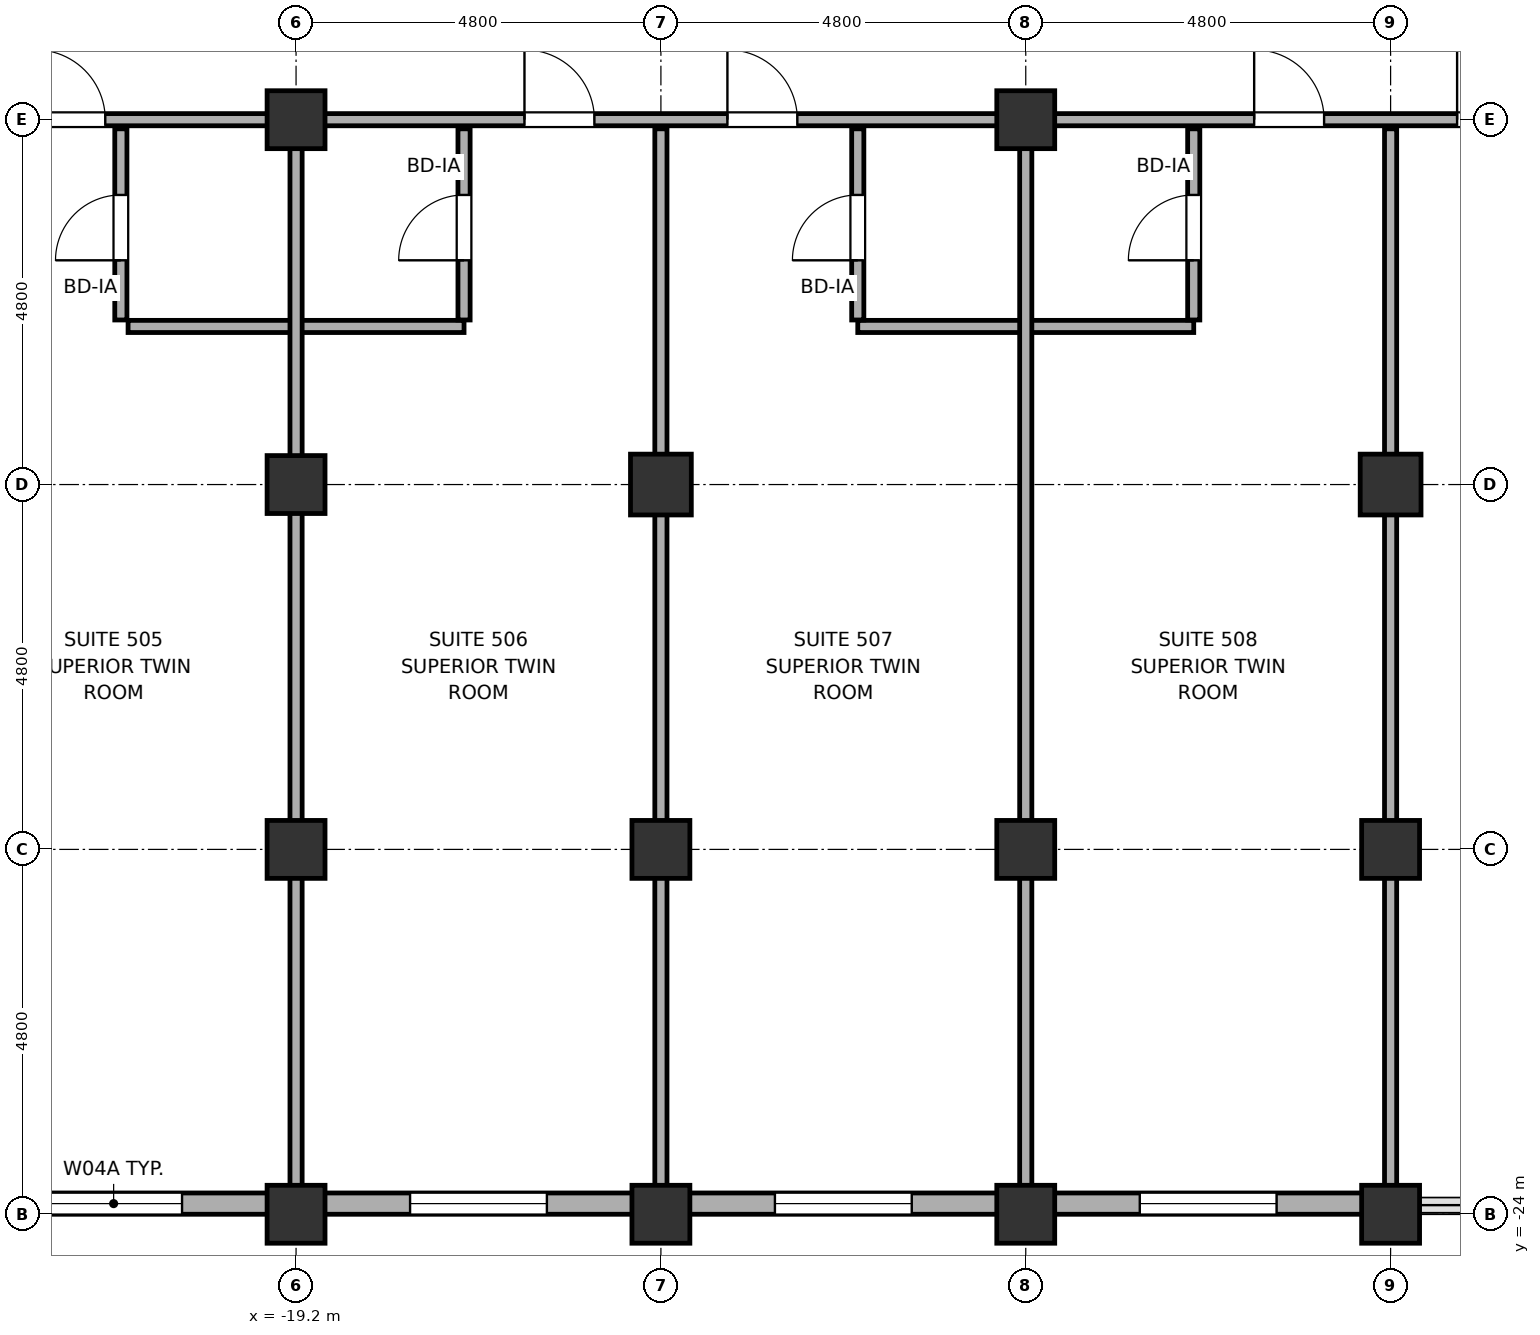
"""IFC4 building model, lengths in metres.
Left out: names, types, materials, properties, quantities, classifications, styles, units other than length and angle.
Written with IfcOpenShell. Run it as: python <this file> out.ifc"""

import sys

from ifc_helpers import new_model, si_unit, direction, frame, frame_2d, origin, origin_2d, place, context, subcontext, project, spatial, rectangle, hollow_rectangle, hollow_circle, extrude, element, fill, save


model = new_model("IFC4")
c1 = context("Model", 3, precision=1e-05, world=origin(), true_north=direction((0.0, 1.0)))
c2 = subcontext(c1, "Body", "Model", "MODEL_VIEW")
j1 = project(units=[si_unit("LENGTHUNIT", "METRE"), si_unit("PLANEANGLEUNIT", "RADIAN")], contexts=[c1])
p1 = place(None, origin())
s1 = spatial("IfcSite", under=j1, at=p1, CompositionType="ELEMENT")
p2 = place(p1, origin())
s2 = spatial("IfcBuilding", under=s1, at=p2, CompositionType="ELEMENT")
p3 = place(p2, frame((0.0, 0.0, 30.0)))
s3 = spatial("IfcBuildingStorey", under=s2, at=p3, CompositionType="ELEMENT", Elevation=30.0)
for number, where, z_axis, x_axis in (
    (1, (-19.2, -24.0, 0.0), (0.0, 0.0, 1.0), (1.0, 0.0, 0.0)),
    (2, (-19.2, -19.2, 0.0), (0.0, 0.0, 1.0), (1.0, 0.0, 0.0)),
    (3, (-19.2, -14.4, 0.0), (0.0, 0.0, 1.0), (1.0, 0.0, 0.0)),
    (4, (-19.2, -9.6, 0.0), (0.0, 0.0, 1.0), (1.0, 0.0, 0.0)),
    (5, (-14.4, -24.0, 0.0), (0.0, 0.0, 1.0), (1.0, 0.0, 0.0)),
    (6, (-14.4, -19.2, 0.0), (0.0, 0.0, 1.0), (1.0, 0.0, 0.0)),
):
    element("IfcColumn", number, at=place(p3, frame(where, z_axis=z_axis, x_axis=x_axis)), inside=s3, PredefinedType="COLUMN", context=c2, shape_type="SweptSolid", body=[
        extrude(hollow_circle(Radius=0.381, WallThickness=0.032, at=origin_2d()), origin(), (0.0, 0.0, 1.0), 3.7),
    ])
p4 = place(p3, frame((-14.4, -14.4, 0.0), z_axis=(0.0, 0.0, 1.0), x_axis=(1.0, 0.0, 0.0)))
e7 = element("IfcColumn", 7, at=p4, inside=s3, PredefinedType="COLUMN", context=c2, shape_type="SweptSolid", body=[
    extrude(hollow_rectangle(XDim=0.8, YDim=0.8, WallThickness=0.036, at=origin_2d()), origin(), (0.0, 0.0, 1.0), 3.7),
])
for number, where, z_axis, x_axis in (
    (8, (-9.6, -24.0, 0.0), (0.0, 0.0, 1.0), (1.0, 0.0, 0.0)),
    (9, (-9.6, -19.2, 0.0), (0.0, 0.0, 1.0), (1.0, 0.0, 0.0)),
    (10, (-9.6, -9.6, 0.0), (0.0, 0.0, 1.0), (1.0, 0.0, 0.0)),
    (11, (-4.8, -24.0, 0.0), (0.0, 0.0, 1.0), (1.0, 0.0, 0.0)),
    (12, (-4.8, -19.2, 0.0), (0.0, 0.0, 1.0), (1.0, 0.0, 0.0)),
):
    element("IfcColumn", number, at=place(p3, frame(where, z_axis=z_axis, x_axis=x_axis)), inside=s3, PredefinedType="COLUMN", context=c2, shape_type="SweptSolid", body=[
        extrude(hollow_circle(Radius=0.381, WallThickness=0.032, at=origin_2d()), origin(), (0.0, 0.0, 1.0), 3.7),
    ])
p5 = place(p3, frame((-4.8, -14.4, 0.0), z_axis=(0.0, 0.0, 1.0), x_axis=(1.0, 0.0, 0.0)))
e13 = element("IfcColumn", 13, at=p5, inside=s3, PredefinedType="COLUMN", context=c2, shape_type="SweptSolid", body=[
    extrude(hollow_rectangle(XDim=0.8, YDim=0.8, WallThickness=0.036, at=origin_2d()), origin(), (0.0, 0.0, 1.0), 3.7),
])
p6 = place(p3, frame((-30.0, -23.86, 0.0), z_axis=(0.0, 0.0, 1.0), x_axis=(1.0, 0.0, 0.0)))
e14 = element("IfcWall", 14, at=p6, inside=s3, PredefinedType="SOLIDWALL", context=c2, shape_type="SweptSolid", body=[
    extrude(rectangle(XDim=25.25, YDim=0.28, at=frame_2d((12.625, 0.0))), origin(), (0.0, 0.0, 1.0), 2.12),
])
p7 = place(p6, frame((7.5, 0.0, 0.75)))
e15 = element("IfcOpeningElement", 15, at=p7, cuts=e14, PredefinedType="OPENING", context=c2, shape_type="SweptSolid", body=[
    extrude(rectangle(XDim=1.8, YDim=1.15, at=frame_2d((0.9, 0.575))), frame((0.0, 0.155, 0.0), z_axis=(0.0, -1.0, 0.0), x_axis=(1.0, 0.0, 0.0)), (0.0, 0.0, 1.0), 0.31),
])
p8 = place(p6, frame((12.3, 0.0, 0.75)))
e16 = element("IfcOpeningElement", 16, at=p8, cuts=e14, PredefinedType="OPENING", context=c2, shape_type="SweptSolid", body=[
    extrude(rectangle(XDim=1.8, YDim=1.15, at=frame_2d((0.9, 0.575))), frame((0.0, 0.155, 0.0), z_axis=(0.0, -1.0, 0.0), x_axis=(1.0, 0.0, 0.0)), (0.0, 0.0, 1.0), 0.31),
])
p9 = place(p6, frame((17.1, 0.0, 0.75)))
e17 = element("IfcOpeningElement", 17, at=p9, cuts=e14, PredefinedType="OPENING", context=c2, shape_type="SweptSolid", body=[
    extrude(rectangle(XDim=1.8, YDim=1.15, at=frame_2d((0.9, 0.575))), frame((0.0, 0.155, 0.0), z_axis=(0.0, -1.0, 0.0), x_axis=(1.0, 0.0, 0.0)), (0.0, 0.0, 1.0), 0.31),
])
p10 = place(p6, frame((21.9, 0.0, 0.75)))
e18 = element("IfcOpeningElement", 18, at=p10, cuts=e14, PredefinedType="OPENING", context=c2, shape_type="SweptSolid", body=[
    extrude(rectangle(XDim=1.8, YDim=1.15, at=frame_2d((0.9, 0.575))), frame((0.0, 0.155, 0.0), z_axis=(0.0, -1.0, 0.0), x_axis=(1.0, 0.0, 0.0)), (0.0, 0.0, 1.0), 0.31),
])
p11 = place(p3, frame((-21.41, -12.32, 0.0), z_axis=(0.0, 0.0, 1.0), x_axis=(1.0, 0.0, 0.0)))
e19 = element("IfcWall", 19, at=p11, inside=s3, PredefinedType="PARTITIONING", context=c2, shape_type="SweptSolid", body=[
    extrude(rectangle(XDim=4.42, YDim=0.16, at=frame_2d((2.21, 0.0))), origin(), (0.0, 0.0, 1.0), 2.82),
])
p12 = place(p3, frame((-11.81, -12.32, 0.0), z_axis=(0.0, 0.0, 1.0), x_axis=(1.0, 0.0, 0.0)))
e20 = element("IfcWall", 20, at=p12, inside=s3, PredefinedType="PARTITIONING", context=c2, shape_type="SweptSolid", body=[
    extrude(rectangle(XDim=4.42, YDim=0.16, at=frame_2d((2.21, 0.0))), origin(), (0.0, 0.0, 1.0), 3.02),
])
p13 = place(p3, frame((-33.31, -9.6, 0.0), z_axis=(0.0, 0.0, 1.0), x_axis=(1.0, 0.0, 0.0)))
e21 = element("IfcWall", 21, at=p13, inside=s3, PredefinedType="PARTITIONING", context=c2, shape_type="SweptSolid", body=[
    extrude(rectangle(XDim=61.82, YDim=0.16, at=frame_2d((30.91, 0.0))), origin(), (0.0, 0.0, 1.0), 2.12),
])
p14 = place(p13, frame((6.679, 0.0, 0.0)))
e22 = element("IfcOpeningElement", 22, at=p14, cuts=e21, PredefinedType="OPENING", context=c2, shape_type="SweptSolid", body=[
    extrude(rectangle(XDim=0.9, YDim=2.02, at=frame_2d((0.45, 1.01))), frame((0.0, 0.095, 0.0), z_axis=(0.0, -1.0, 0.0), x_axis=(1.0, 0.0, 0.0)), (0.0, 0.0, 1.0), 0.19),
])
p15 = place(p13, frame((54.24, 0.0, 0.0)))
e23 = element("IfcOpeningElement", 23, at=p15, cuts=e21, PredefinedType="OPENING", context=c2, shape_type="SweptSolid", body=[
    extrude(rectangle(XDim=0.9, YDim=2.02, at=frame_2d((0.45, 1.01))), frame((0.0, 0.095, 0.0), z_axis=(0.0, -1.0, 0.0), x_axis=(1.0, 0.0, 0.0)), (0.0, 0.0, 1.0), 0.19),
])
p16 = place(p13, frame((10.68, 0.0, 0.0)))
e24 = element("IfcOpeningElement", 24, at=p16, cuts=e21, PredefinedType="OPENING", context=c2, shape_type="SweptSolid", body=[
    extrude(rectangle(XDim=0.92, YDim=2.02, at=frame_2d((0.46, 1.01))), frame((0.0, 0.095, 0.0), z_axis=(0.0, -1.0, 0.0), x_axis=(1.0, 0.0, 0.0)), (0.0, 0.0, 1.0), 0.19),
])
p17 = place(p13, frame((17.115, 0.0, 0.0)))
e25 = element("IfcOpeningElement", 25, at=p17, cuts=e21, PredefinedType="OPENING", context=c2, shape_type="SweptSolid", body=[
    extrude(rectangle(XDim=0.92, YDim=2.02, at=frame_2d((0.46, 1.01))), frame((0.0, 0.095, 0.0), z_axis=(0.0, -1.0, 0.0), x_axis=(1.0, 0.0, 0.0)), (0.0, 0.0, 1.0), 0.19),
])
p18 = place(p13, frame((19.785, 0.0, 0.0)))
e26 = element("IfcOpeningElement", 26, at=p18, cuts=e21, PredefinedType="OPENING", context=c2, shape_type="SweptSolid", body=[
    extrude(rectangle(XDim=0.92, YDim=2.02, at=frame_2d((0.46, 1.01))), frame((0.0, 0.095, 0.0), z_axis=(0.0, -1.0, 0.0), x_axis=(1.0, 0.0, 0.0)), (0.0, 0.0, 1.0), 0.19),
])
p19 = place(p13, frame((26.715, 0.0, 0.0)))
e27 = element("IfcOpeningElement", 27, at=p19, cuts=e21, PredefinedType="OPENING", context=c2, shape_type="SweptSolid", body=[
    extrude(rectangle(XDim=0.92, YDim=2.02, at=frame_2d((0.46, 1.01))), frame((0.0, 0.095, 0.0), z_axis=(0.0, -1.0, 0.0), x_axis=(1.0, 0.0, 0.0)), (0.0, 0.0, 1.0), 0.19),
])
p20 = place(p13, frame((29.385, 0.0, 0.0)))
e28 = element("IfcOpeningElement", 28, at=p20, cuts=e21, PredefinedType="OPENING", context=c2, shape_type="SweptSolid", body=[
    extrude(rectangle(XDim=0.92, YDim=2.02, at=frame_2d((0.46, 1.01))), frame((0.0, 0.095, 0.0), z_axis=(0.0, -1.0, 0.0), x_axis=(1.0, 0.0, 0.0)), (0.0, 0.0, 1.0), 0.19),
])
p21 = place(p13, frame((36.315, 0.0, 0.0)))
e29 = element("IfcOpeningElement", 29, at=p21, cuts=e21, PredefinedType="OPENING", context=c2, shape_type="SweptSolid", body=[
    extrude(rectangle(XDim=0.92, YDim=2.02, at=frame_2d((0.46, 1.01))), frame((0.0, 0.095, 0.0), z_axis=(0.0, -1.0, 0.0), x_axis=(1.0, 0.0, 0.0)), (0.0, 0.0, 1.0), 0.19),
])
p22 = place(p13, frame((38.985, 0.0, 0.0)))
e30 = element("IfcOpeningElement", 30, at=p22, cuts=e21, PredefinedType="OPENING", context=c2, shape_type="SweptSolid", body=[
    extrude(rectangle(XDim=0.92, YDim=2.02, at=frame_2d((0.46, 1.01))), frame((0.0, 0.095, 0.0), z_axis=(0.0, -1.0, 0.0), x_axis=(1.0, 0.0, 0.0)), (0.0, 0.0, 1.0), 0.19),
])
p23 = place(p13, frame((45.915, 0.0, 0.0)))
e31 = element("IfcOpeningElement", 31, at=p23, cuts=e21, PredefinedType="OPENING", context=c2, shape_type="SweptSolid", body=[
    extrude(rectangle(XDim=0.92, YDim=2.02, at=frame_2d((0.46, 1.01))), frame((0.0, 0.095, 0.0), z_axis=(0.0, -1.0, 0.0), x_axis=(1.0, 0.0, 0.0)), (0.0, 0.0, 1.0), 0.19),
])
p24 = place(p13, frame((48.585, 0.0, 0.0)))
e32 = element("IfcOpeningElement", 32, at=p24, cuts=e21, PredefinedType="OPENING", context=c2, shape_type="SweptSolid", body=[
    extrude(rectangle(XDim=0.92, YDim=2.02, at=frame_2d((0.46, 1.01))), frame((0.0, 0.095, 0.0), z_axis=(0.0, -1.0, 0.0), x_axis=(1.0, 0.0, 0.0)), (0.0, 0.0, 1.0), 0.19),
])
p25 = place(p3, frame((-21.505, -12.235, 0.0), z_axis=(0.0, 0.0, 1.0), x_axis=(0.0, 1.0, 0.0)))
e33 = element("IfcWall", 33, at=p25, inside=s3, PredefinedType="PARTITIONING", context=c2, shape_type="SweptSolid", body=[
    extrude(rectangle(XDim=2.515, YDim=0.16, at=frame_2d((1.258, 0.0))), origin(), (0.0, 0.0, 1.0), 2.12),
])
p26 = place(p25, frame((0.785, 0.0, 0.0)))
e34 = element("IfcOpeningElement", 34, at=p26, cuts=e33, PredefinedType="OPENING", context=c2, shape_type="SweptSolid", body=[
    extrude(rectangle(XDim=0.86, YDim=2.02, at=frame_2d((0.43, 1.01))), frame((0.0, 0.095, 0.0), z_axis=(0.0, -1.0, 0.0), x_axis=(1.0, 0.0, 0.0)), (0.0, 0.0, 1.0), 0.19),
])
p27 = place(p3, frame((-19.2, -23.71, 0.0), z_axis=(0.0, 0.0, 1.0), x_axis=(0.0, 1.0, 0.0)))
e35 = element("IfcWall", 35, at=p27, inside=s3, PredefinedType="PARTITIONING", context=c2, shape_type="SweptSolid", body=[
    extrude(rectangle(XDim=13.99, YDim=0.16, at=frame_2d((6.995, 0.0))), origin(), (0.0, 0.0, 1.0), 2.12),
])
p28 = place(p3, frame((-16.99, -12.235, 0.0), z_axis=(0.0, 0.0, 1.0), x_axis=(0.0, 1.0, 0.0)))
e36 = element("IfcWall", 36, at=p28, inside=s3, PredefinedType="PARTITIONING", context=c2, shape_type="SweptSolid", body=[
    extrude(rectangle(XDim=2.515, YDim=0.16, at=frame_2d((1.258, 0.0))), origin(), (0.0, 0.0, 1.0), 2.12),
])
p29 = place(p28, frame((0.785, 0.0, 0.0)))
e37 = element("IfcOpeningElement", 37, at=p29, cuts=e36, PredefinedType="OPENING", context=c2, shape_type="SweptSolid", body=[
    extrude(rectangle(XDim=0.86, YDim=2.02, at=frame_2d((0.43, 1.01))), frame((0.0, 0.095, 0.0), z_axis=(0.0, -1.0, 0.0), x_axis=(1.0, 0.0, 0.0)), (0.0, 0.0, 1.0), 0.19),
])
p30 = place(p3, frame((-14.4, -23.71, 0.0), z_axis=(0.0, 0.0, 1.0), x_axis=(0.0, 1.0, 0.0)))
e38 = element("IfcWall", 38, at=p30, inside=s3, PredefinedType="PARTITIONING", context=c2, shape_type="SweptSolid", body=[
    extrude(rectangle(XDim=13.99, YDim=0.16, at=frame_2d((6.995, 0.0))), origin(), (0.0, 0.0, 1.0), 2.12),
])
p31 = place(p3, frame((-11.81, -12.235, 0.0), z_axis=(0.0, 0.0, 1.0), x_axis=(0.0, 1.0, 0.0)))
e39 = element("IfcWall", 39, at=p31, inside=s3, PredefinedType="PARTITIONING", context=c2, shape_type="SweptSolid", body=[
    extrude(rectangle(XDim=2.515, YDim=0.16, at=frame_2d((1.258, 0.0))), origin(), (0.0, 0.0, 1.0), 2.12),
])
p32 = place(p31, frame((0.785, 0.0, 0.0)))
e40 = element("IfcOpeningElement", 40, at=p32, cuts=e39, PredefinedType="OPENING", context=c2, shape_type="SweptSolid", body=[
    extrude(rectangle(XDim=0.86, YDim=2.02, at=frame_2d((0.43, 1.01))), frame((0.0, 0.095, 0.0), z_axis=(0.0, -1.0, 0.0), x_axis=(1.0, 0.0, 0.0)), (0.0, 0.0, 1.0), 0.19),
])
p33 = place(p3, frame((-9.6, -23.71, 0.0), z_axis=(0.0, 0.0, 1.0), x_axis=(0.0, 1.0, 0.0)))
e41 = element("IfcWall", 41, at=p33, inside=s3, PredefinedType="PARTITIONING", context=c2, shape_type="SweptSolid", body=[
    extrude(rectangle(XDim=13.99, YDim=0.16, at=frame_2d((6.995, 0.0))), origin(), (0.0, 0.0, 1.0), 2.12),
])
p34 = place(p3, frame((-7.39, -12.235, 0.0), z_axis=(0.0, 0.0, 1.0), x_axis=(0.0, 1.0, 0.0)))
e42 = element("IfcWall", 42, at=p34, inside=s3, PredefinedType="PARTITIONING", context=c2, shape_type="SweptSolid", body=[
    extrude(rectangle(XDim=2.515, YDim=0.16, at=frame_2d((1.258, 0.0))), origin(), (0.0, 0.0, 1.0), 2.12),
])
p35 = place(p34, frame((0.785, 0.0, 0.0)))
e43 = element("IfcOpeningElement", 43, at=p35, cuts=e42, PredefinedType="OPENING", context=c2, shape_type="SweptSolid", body=[
    extrude(rectangle(XDim=0.86, YDim=2.02, at=frame_2d((0.43, 1.01))), frame((0.0, 0.095, 0.0), z_axis=(0.0, -1.0, 0.0), x_axis=(1.0, 0.0, 0.0)), (0.0, 0.0, 1.0), 0.19),
])
p36 = place(p3, frame((-4.8, -23.71, 0.0), z_axis=(0.0, 0.0, 1.0), x_axis=(0.0, 1.0, 0.0)))
e44 = element("IfcWall", 44, at=p36, inside=s3, PredefinedType="PARTITIONING", context=c2, shape_type="SweptSolid", body=[
    extrude(rectangle(XDim=13.99, YDim=0.16, at=frame_2d((6.995, 0.0))), origin(), (0.0, 0.0, 1.0), 2.12),
])
p37 = place(p7, origin())
e45 = element("IfcWindow", 45, at=p37, inside=s3, PartitioningType="SINGLE_PANEL", PredefinedType="WINDOW", context=c2, shape_type="SweptSolid", body=[
    extrude(rectangle(XDim=1.8, YDim=1.15, at=frame_2d((0.9, 0.575))), frame((0.0, 0.03, 0.0), z_axis=(0.0, -1.0, 0.0), x_axis=(1.0, 0.0, 0.0)), (0.0, 0.0, 1.0), 0.06),
])
fill(e15, e45)
p38 = place(p8, origin())
e46 = element("IfcWindow", 46, at=p38, inside=s3, PartitioningType="SINGLE_PANEL", PredefinedType="WINDOW", context=c2, shape_type="SweptSolid", body=[
    extrude(rectangle(XDim=1.8, YDim=1.15, at=frame_2d((0.9, 0.575))), frame((0.0, 0.03, 0.0), z_axis=(0.0, -1.0, 0.0), x_axis=(1.0, 0.0, 0.0)), (0.0, 0.0, 1.0), 0.06),
])
fill(e16, e46)
p39 = place(p9, origin())
e47 = element("IfcWindow", 47, at=p39, inside=s3, PartitioningType="SINGLE_PANEL", PredefinedType="WINDOW", context=c2, shape_type="SweptSolid", body=[
    extrude(rectangle(XDim=1.8, YDim=1.15, at=frame_2d((0.9, 0.575))), frame((0.0, 0.03, 0.0), z_axis=(0.0, -1.0, 0.0), x_axis=(1.0, 0.0, 0.0)), (0.0, 0.0, 1.0), 0.06),
])
fill(e17, e47)
p40 = place(p10, origin())
e48 = element("IfcWindow", 48, at=p40, inside=s3, PartitioningType="SINGLE_PANEL", PredefinedType="WINDOW", context=c2, shape_type="SweptSolid", body=[
    extrude(rectangle(XDim=1.8, YDim=1.15, at=frame_2d((0.9, 0.575))), frame((0.0, 0.03, 0.0), z_axis=(0.0, -1.0, 0.0), x_axis=(1.0, 0.0, 0.0)), (0.0, 0.0, 1.0), 0.06),
])
fill(e18, e48)
p41 = place(p16, origin())
e49 = element("IfcDoor", 49, at=p41, inside=s3, OperationType="SINGLE_SWING_RIGHT", PredefinedType="DOOR", context=c2, shape_type="SweptSolid", body=[
    extrude(rectangle(XDim=0.92, YDim=2.02, at=frame_2d((0.46, 1.01))), frame((0.0, 0.025, 0.0), z_axis=(0.0, -1.0, 0.0), x_axis=(1.0, 0.0, 0.0)), (0.0, 0.0, 1.0), 0.05),
])
fill(e24, e49)
p42 = place(p26, origin())
e50 = element("IfcDoor", 50, at=p42, inside=s3, OperationType="SINGLE_SWING_RIGHT", PredefinedType="DOOR", context=c2, shape_type="SweptSolid", body=[
    extrude(rectangle(XDim=0.86, YDim=2.02, at=frame_2d((0.43, 1.01))), frame((0.0, 0.025, 0.0), z_axis=(0.0, -1.0, 0.0), x_axis=(1.0, 0.0, 0.0)), (0.0, 0.0, 1.0), 0.05),
])
fill(e34, e50)
p43 = place(p17, origin())
e51 = element("IfcDoor", 51, at=p43, inside=s3, OperationType="SINGLE_SWING_LEFT", PredefinedType="DOOR", context=c2, shape_type="SweptSolid", body=[
    extrude(rectangle(XDim=0.92, YDim=2.02, at=frame_2d((0.46, 1.01))), frame((0.0, 0.025, 0.0), z_axis=(0.0, -1.0, 0.0), x_axis=(1.0, 0.0, 0.0)), (0.0, 0.0, 1.0), 0.05),
])
fill(e25, e51)
p44 = place(p29, origin())
e52 = element("IfcDoor", 52, at=p44, inside=s3, OperationType="SINGLE_SWING_RIGHT", PredefinedType="DOOR", context=c2, shape_type="SweptSolid", body=[
    extrude(rectangle(XDim=0.86, YDim=2.02, at=frame_2d((0.43, 1.01))), frame((0.0, 0.025, 0.0), z_axis=(0.0, -1.0, 0.0), x_axis=(1.0, 0.0, 0.0)), (0.0, 0.0, 1.0), 0.05),
])
fill(e37, e52)
p45 = place(p18, origin())
e53 = element("IfcDoor", 53, at=p45, inside=s3, OperationType="SINGLE_SWING_LEFT", PredefinedType="DOOR", context=c2, shape_type="SweptSolid", body=[
    extrude(rectangle(XDim=0.92, YDim=2.02, at=frame_2d((0.46, 1.01))), frame((0.0, 0.025, 0.0), z_axis=(0.0, -1.0, 0.0), x_axis=(1.0, 0.0, 0.0)), (0.0, 0.0, 1.0), 0.05),
])
fill(e26, e53)
p46 = place(p32, origin())
e54 = element("IfcDoor", 54, at=p46, inside=s3, OperationType="SINGLE_SWING_RIGHT", PredefinedType="DOOR", context=c2, shape_type="SweptSolid", body=[
    extrude(rectangle(XDim=0.86, YDim=2.02, at=frame_2d((0.43, 1.01))), frame((0.0, 0.025, 0.0), z_axis=(0.0, -1.0, 0.0), x_axis=(1.0, 0.0, 0.0)), (0.0, 0.0, 1.0), 0.05),
])
fill(e40, e54)
p47 = place(p19, origin())
e55 = element("IfcDoor", 55, at=p47, inside=s3, OperationType="SINGLE_SWING_RIGHT", PredefinedType="DOOR", context=c2, shape_type="SweptSolid", body=[
    extrude(rectangle(XDim=0.92, YDim=2.02, at=frame_2d((0.46, 1.01))), frame((0.0, 0.025, 0.0), z_axis=(0.0, -1.0, 0.0), x_axis=(1.0, 0.0, 0.0)), (0.0, 0.0, 1.0), 0.05),
])
fill(e27, e55)
p48 = place(p35, origin())
e56 = element("IfcDoor", 56, at=p48, inside=s3, OperationType="SINGLE_SWING_RIGHT", PredefinedType="DOOR", context=c2, shape_type="SweptSolid", body=[
    extrude(rectangle(XDim=0.86, YDim=2.02, at=frame_2d((0.43, 1.01))), frame((0.0, 0.025, 0.0), z_axis=(0.0, -1.0, 0.0), x_axis=(1.0, 0.0, 0.0)), (0.0, 0.0, 1.0), 0.05),
])
fill(e43, e56)
p49 = place(p20, origin())
e57 = element("IfcDoor", 57, at=p49, inside=s3, OperationType="SINGLE_SWING_LEFT", PredefinedType="DOOR", context=c2, shape_type="SweptSolid", body=[
    extrude(rectangle(XDim=0.92, YDim=2.02, at=frame_2d((0.46, 1.01))), frame((0.0, 0.025, 0.0), z_axis=(0.0, -1.0, 0.0), x_axis=(1.0, 0.0, 0.0)), (0.0, 0.0, 1.0), 0.05),
])
fill(e28, e57)
save(model, sys.argv[1])
